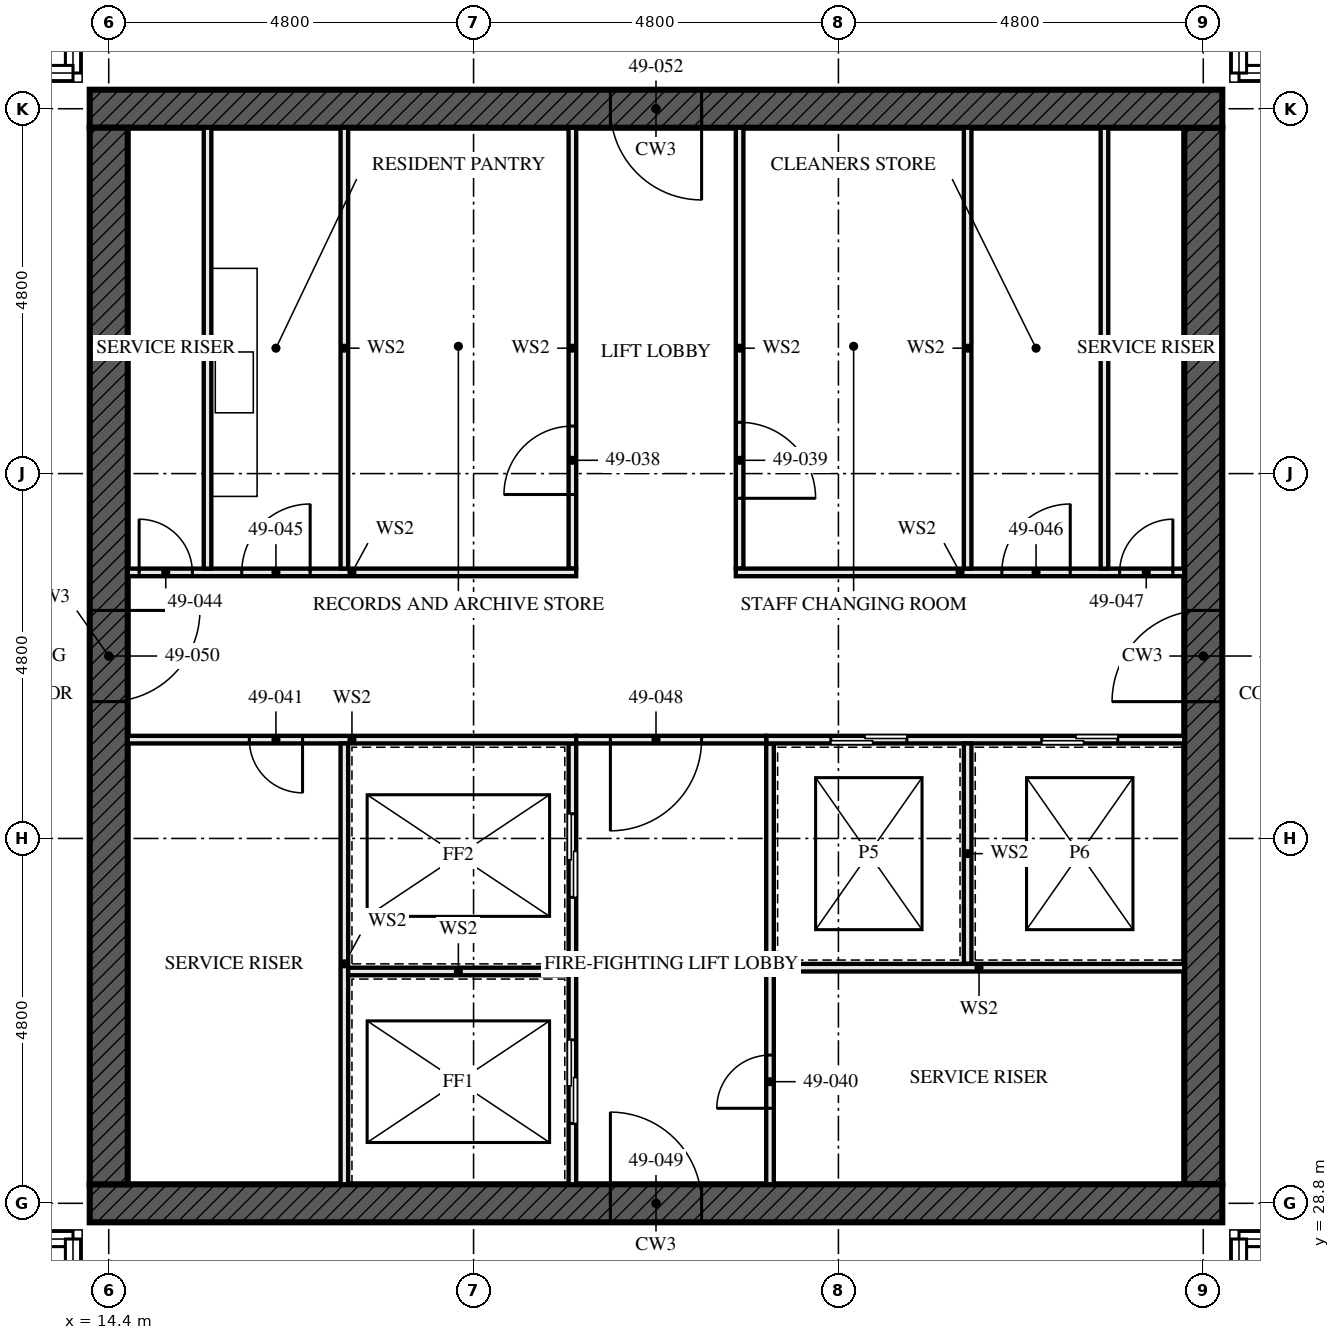
"""IFC4 building model, lengths in metres.
Left out: names, types, materials, properties, quantities, classifications, styles, units other than length and angle.
Written with IfcOpenShell. Run it as: python <this file> out.ifc"""

import sys

from ifc_helpers import new_model, si_unit, direction, frame, frame_2d, origin, place, context, subcontext, project, spatial, rectangle, extrude, element, fill, save


model = new_model("IFC4")
c1 = context("Model", 3, precision=1e-05, world=origin(), true_north=direction((0.0, 1.0)))
c2 = subcontext(c1, "Body", "Model", "MODEL_VIEW")
j1 = project(units=[si_unit("LENGTHUNIT", "METRE"), si_unit("PLANEANGLEUNIT", "RADIAN")], contexts=[c1])
p1 = place(None, origin())
s1 = spatial("IfcSite", under=j1, at=p1, CompositionType="ELEMENT")
p2 = place(p1, origin())
s2 = spatial("IfcBuilding", under=s1, at=p2, CompositionType="ELEMENT")
p3 = place(p2, frame((0.0, 0.0, 179.5)))
s3 = spatial("IfcBuildingStorey", under=s2, at=p3, CompositionType="ELEMENT", Elevation=179.5)
p4 = place(p3, frame((14.15, 28.8, -0.17), z_axis=(0.0, 0.0, 1.0), x_axis=(1.0, 0.0, 0.0)))
e1 = element("IfcWall", 1, at=p4, inside=s3, PredefinedType="SHEAR", context=c2, shape_type="SweptSolid", body=[
    extrude(rectangle(XDim=14.9, YDim=0.5, at=frame_2d((7.45, 0.0))), origin(), (0.0, 0.0, 1.0), 3.5),
])
p5 = place(p4, frame((6.85, 0.0, 0.17)))
e2 = element("IfcOpeningElement", 2, at=p5, cuts=e1, PredefinedType="OPENING", context=c2, shape_type="SweptSolid", body=[
    extrude(rectangle(XDim=1.2, YDim=2.1, at=frame_2d((0.6, 1.05))), frame((0.0, 0.26, 0.0), z_axis=(0.0, -1.0, 0.0), x_axis=(1.0, 0.0, 0.0)), (0.0, 0.0, 1.0), 0.521),
])
p6 = place(p3, frame((29.05, 43.2, -0.17), z_axis=(0.0, 0.0, 1.0), x_axis=(-1.0, 0.0, 0.0)))
e3 = element("IfcWall", 3, at=p6, inside=s3, PredefinedType="SHEAR", context=c2, shape_type="SweptSolid", body=[
    extrude(rectangle(XDim=14.9, YDim=0.5, at=frame_2d((7.45, 0.0))), origin(), (0.0, 0.0, 1.0), 3.5),
])
p7 = place(p6, frame((6.85, 0.0, 0.17)))
e4 = element("IfcOpeningElement", 4, at=p7, cuts=e3, PredefinedType="OPENING", context=c2, shape_type="SweptSolid", body=[
    extrude(rectangle(XDim=1.2, YDim=2.1, at=frame_2d((0.6, 1.05))), frame((0.0, 0.26, 0.0), z_axis=(0.0, -1.0, 0.0), x_axis=(1.0, 0.0, 0.0)), (0.0, 0.0, 1.0), 0.521),
])
p8 = place(p3, frame((14.4, 42.95, -0.17), z_axis=(0.0, 0.0, 1.0), x_axis=(0.0, -1.0, 0.0)))
e5 = element("IfcWall", 5, at=p8, inside=s3, PredefinedType="SHEAR", context=c2, shape_type="SweptSolid", body=[
    extrude(rectangle(XDim=13.9, YDim=0.5, at=frame_2d((6.95, 0.0))), origin(), (0.0, 0.0, 1.0), 3.5),
])
p9 = place(p8, frame((6.35, 0.0, 0.17)))
e6 = element("IfcOpeningElement", 6, at=p9, cuts=e5, PredefinedType="OPENING", context=c2, shape_type="SweptSolid", body=[
    extrude(rectangle(XDim=1.2, YDim=2.1, at=frame_2d((0.6, 1.05))), frame((0.0, 0.26, 0.0), z_axis=(0.0, -1.0, 0.0), x_axis=(1.0, 0.0, 0.0)), (0.0, 0.0, 1.0), 0.521),
])
p10 = place(p3, frame((28.8, 29.05, -0.17), z_axis=(0.0, 0.0, 1.0), x_axis=(0.0, 1.0, 0.0)))
e7 = element("IfcWall", 7, at=p10, inside=s3, PredefinedType="SHEAR", context=c2, shape_type="SweptSolid", body=[
    extrude(rectangle(XDim=13.9, YDim=0.5, at=frame_2d((6.95, 0.0))), origin(), (0.0, 0.0, 1.0), 3.5),
])
p11 = place(p10, frame((6.35, 0.0, 0.17)))
e8 = element("IfcOpeningElement", 8, at=p11, cuts=e7, PredefinedType="OPENING", context=c2, shape_type="SweptSolid", body=[
    extrude(rectangle(XDim=1.2, YDim=2.1, at=frame_2d((0.6, 1.05))), frame((0.0, 0.26, 0.0), z_axis=(0.0, -1.0, 0.0), x_axis=(1.0, 0.0, 0.0)), (0.0, 0.0, 1.0), 0.521),
])
for number, where, z_axis, x_axis in (
    (9, (15.7, 37.15, 0.0), (0.0, 0.0, 1.0), (0.0, 1.0, 0.0)),
    (10, (27.5, 37.15, 0.0), (0.0, 0.0, 1.0), (0.0, 1.0, 0.0)),
):
    element("IfcWall", number, at=place(p3, frame(where, z_axis=z_axis, x_axis=x_axis)), inside=s3, PredefinedType="SOLIDWALL", context=c2, shape_type="SweptSolid", body=[
        extrude(rectangle(XDim=5.8, YDim=0.1, at=frame_2d((2.9, 0.0))), origin(), (0.0, 0.0, 1.0), 3.33),
    ])
p12 = place(p3, frame((20.5, 29.05, 0.0), z_axis=(0.0, 0.0, 1.0), x_axis=(0.0, 1.0, 0.0)))
e11 = element("IfcWall", 11, at=p12, inside=s3, PredefinedType="SOLIDWALL", context=c2, shape_type="SweptSolid", body=[
    extrude(rectangle(XDim=5.8, YDim=0.1, at=frame_2d((2.9, 0.0))), origin(), (0.0, 0.0, 1.0), 3.33),
])
p13 = place(p12, frame((0.8, 0.0, 0.0)))
e12 = element("IfcOpeningElement", 12, at=p13, cuts=e11, PredefinedType="OPENING", context=c2, shape_type="SweptSolid", body=[
    extrude(rectangle(XDim=1.1, YDim=2.3, at=frame_2d((0.55, 1.15))), frame((0.0, 0.061, 0.0), z_axis=(0.0, -1.0, 0.0), x_axis=(1.0, 0.0, 0.0)), (0.0, 0.0, 1.0), 0.121),
])
p14 = place(p12, frame((3.775, 0.0, 0.0)))
e13 = element("IfcOpeningElement", 13, at=p14, cuts=e11, PredefinedType="OPENING", context=c2, shape_type="SweptSolid", body=[
    extrude(rectangle(XDim=1.1, YDim=2.3, at=frame_2d((0.55, 1.15))), frame((0.0, 0.061, 0.0), z_axis=(0.0, -1.0, 0.0), x_axis=(1.0, 0.0, 0.0)), (0.0, 0.0, 1.0), 0.121),
])
p15 = place(p3, frame((20.5, 37.15, 0.0), z_axis=(0.0, 0.0, 1.0), x_axis=(0.0, 1.0, 0.0)))
e14 = element("IfcWall", 14, at=p15, inside=s3, PredefinedType="SOLIDWALL", context=c2, shape_type="SweptSolid", body=[
    extrude(rectangle(XDim=5.8, YDim=0.1, at=frame_2d((2.9, 0.0))), origin(), (0.0, 0.0, 1.0), 3.33),
])
p16 = place(p15, frame((0.975, 0.0, 0.0)))
e15 = element("IfcOpeningElement", 15, at=p16, cuts=e14, PredefinedType="OPENING", context=c2, shape_type="SweptSolid", body=[
    extrude(rectangle(XDim=0.9, YDim=2.1, at=frame_2d((0.45, 1.05))), frame((0.0, 0.061, 0.0), z_axis=(0.0, -1.0, 0.0), x_axis=(1.0, 0.0, 0.0)), (0.0, 0.0, 1.0), 0.121),
])
p17 = place(p3, frame((22.7, 37.15, 0.0), z_axis=(0.0, 0.0, 1.0), x_axis=(0.0, 1.0, 0.0)))
e16 = element("IfcWall", 16, at=p17, inside=s3, PredefinedType="SOLIDWALL", context=c2, shape_type="SweptSolid", body=[
    extrude(rectangle(XDim=5.8, YDim=0.1, at=frame_2d((2.9, 0.0))), origin(), (0.0, 0.0, 1.0), 3.33),
])
p18 = place(p17, frame((0.925, 0.0, 0.0)))
e17 = element("IfcOpeningElement", 17, at=p18, cuts=e16, PredefinedType="OPENING", context=c2, shape_type="SweptSolid", body=[
    extrude(rectangle(XDim=1.0, YDim=2.1, at=frame_2d((0.5, 1.05))), frame((0.0, 0.061, 0.0), z_axis=(0.0, -1.0, 0.0), x_axis=(1.0, 0.0, 0.0)), (0.0, 0.0, 1.0), 0.121),
])
p19 = place(p3, frame((23.1, 29.05, 0.0), z_axis=(0.0, 0.0, 1.0), x_axis=(0.0, 1.0, 0.0)))
e18 = element("IfcWall", 18, at=p19, inside=s3, PredefinedType="SOLIDWALL", context=c2, shape_type="SweptSolid", body=[
    extrude(rectangle(XDim=5.8, YDim=0.1, at=frame_2d((2.9, 0.0))), origin(), (0.0, 0.0, 1.0), 3.33),
])
p20 = place(p19, frame((1.0, 0.0, 0.0)))
e19 = element("IfcOpeningElement", 19, at=p20, cuts=e18, PredefinedType="OPENING", context=c2, shape_type="SweptSolid", body=[
    extrude(rectangle(XDim=0.7, YDim=2.1, at=frame_2d((0.35, 1.05))), frame((0.0, 0.061, 0.0), z_axis=(0.0, -1.0, 0.0), x_axis=(1.0, 0.0, 0.0)), (0.0, 0.0, 1.0), 0.121),
])
p21 = place(p3, frame((14.65, 34.9, 0.0), z_axis=(0.0, 0.0, 1.0), x_axis=(1.0, 0.0, 0.0)))
e20 = element("IfcWall", 20, at=p21, inside=s3, PredefinedType="SOLIDWALL", context=c2, shape_type="SweptSolid", body=[
    extrude(rectangle(XDim=5.9, YDim=0.1, at=frame_2d((2.95, 0.0))), origin(), (0.0, 0.0, 1.0), 3.33),
])
p22 = place(p21, frame((1.6, 0.0, 0.0)))
e21 = element("IfcOpeningElement", 21, at=p22, cuts=e20, PredefinedType="OPENING", context=c2, shape_type="SweptSolid", body=[
    extrude(rectangle(XDim=0.7, YDim=2.1, at=frame_2d((0.35, 1.05))), frame((0.0, 0.061, 0.0), z_axis=(0.0, -1.0, 0.0), x_axis=(1.0, 0.0, 0.0)), (0.0, 0.0, 1.0), 0.121),
])
p23 = place(p3, frame((23.05, 34.9, 0.0), z_axis=(0.0, 0.0, 1.0), x_axis=(1.0, 0.0, 0.0)))
e22 = element("IfcWall", 22, at=p23, inside=s3, PredefinedType="SOLIDWALL", context=c2, shape_type="SweptSolid", body=[
    extrude(rectangle(XDim=5.5, YDim=0.1, at=frame_2d((2.75, 0.0))), origin(), (0.0, 0.0, 1.0), 3.33),
])
p24 = place(p23, frame((0.85, 0.0, 0.0)))
e23 = element("IfcOpeningElement", 23, at=p24, cuts=e22, PredefinedType="OPENING", context=c2, shape_type="SweptSolid", body=[
    extrude(rectangle(XDim=1.0, YDim=2.1, at=frame_2d((0.5, 1.05))), frame((0.0, 0.061, 0.0), z_axis=(0.0, -1.0, 0.0), x_axis=(1.0, 0.0, 0.0)), (0.0, 0.0, 1.0), 0.121),
])
p25 = place(p23, frame((3.625, 0.0, 0.0)))
e24 = element("IfcOpeningElement", 24, at=p25, cuts=e22, PredefinedType="OPENING", context=c2, shape_type="SweptSolid", body=[
    extrude(rectangle(XDim=1.0, YDim=2.1, at=frame_2d((0.5, 1.05))), frame((0.0, 0.061, 0.0), z_axis=(0.0, -1.0, 0.0), x_axis=(1.0, 0.0, 0.0)), (0.0, 0.0, 1.0), 0.121),
])
p26 = place(p3, frame((14.65, 37.1, 0.0), z_axis=(0.0, 0.0, 1.0), x_axis=(1.0, 0.0, 0.0)))
e25 = element("IfcWall", 25, at=p26, inside=s3, PredefinedType="SOLIDWALL", context=c2, shape_type="SweptSolid", body=[
    extrude(rectangle(XDim=5.9, YDim=0.1, at=frame_2d((2.95, 0.0))), origin(), (0.0, 0.0, 1.0), 3.33),
])
p27 = place(p26, frame((0.15, 0.0, 0.0)))
e26 = element("IfcOpeningElement", 26, at=p27, cuts=e25, PredefinedType="OPENING", context=c2, shape_type="SweptSolid", body=[
    extrude(rectangle(XDim=0.7, YDim=2.1, at=frame_2d((0.35, 1.05))), frame((0.0, 0.061, 0.0), z_axis=(0.0, -1.0, 0.0), x_axis=(1.0, 0.0, 0.0)), (0.0, 0.0, 1.0), 0.121),
])
p28 = place(p26, frame((1.5, 0.0, 0.0)))
e27 = element("IfcOpeningElement", 27, at=p28, cuts=e25, PredefinedType="OPENING", context=c2, shape_type="SweptSolid", body=[
    extrude(rectangle(XDim=0.9, YDim=2.1, at=frame_2d((0.45, 1.05))), frame((0.0, 0.061, 0.0), z_axis=(0.0, -1.0, 0.0), x_axis=(1.0, 0.0, 0.0)), (0.0, 0.0, 1.0), 0.121),
])
p29 = place(p3, frame((22.65, 37.1, 0.0), z_axis=(0.0, 0.0, 1.0), x_axis=(1.0, 0.0, 0.0)))
e28 = element("IfcWall", 28, at=p29, inside=s3, PredefinedType="SOLIDWALL", context=c2, shape_type="SweptSolid", body=[
    extrude(rectangle(XDim=5.9, YDim=0.1, at=frame_2d((2.95, 0.0))), origin(), (0.0, 0.0, 1.0), 3.33),
])
p30 = place(p29, frame((3.5, 0.0, 0.0)))
e29 = element("IfcOpeningElement", 29, at=p30, cuts=e28, PredefinedType="OPENING", context=c2, shape_type="SweptSolid", body=[
    extrude(rectangle(XDim=0.9, YDim=2.1, at=frame_2d((0.45, 1.05))), frame((0.0, 0.061, 0.0), z_axis=(0.0, -1.0, 0.0), x_axis=(1.0, 0.0, 0.0)), (0.0, 0.0, 1.0), 0.121),
])
p31 = place(p29, frame((5.05, 0.0, 0.0)))
e30 = element("IfcOpeningElement", 30, at=p31, cuts=e28, PredefinedType="OPENING", context=c2, shape_type="SweptSolid", body=[
    extrude(rectangle(XDim=0.7, YDim=2.1, at=frame_2d((0.35, 1.05))), frame((0.0, 0.061, 0.0), z_axis=(0.0, -1.0, 0.0), x_axis=(1.0, 0.0, 0.0)), (0.0, 0.0, 1.0), 0.121),
])
p32 = place(p3, frame((20.55, 34.9, 0.0), z_axis=(0.0, 0.0, 1.0), x_axis=(1.0, 0.0, 0.0)))
e31 = element("IfcWall", 31, at=p32, inside=s3, PredefinedType="SOLIDWALL", context=c2, shape_type="SweptSolid", body=[
    extrude(rectangle(XDim=2.5, YDim=0.1, at=frame_2d((1.25, 0.0))), origin(), (0.0, 0.0, 1.0), 3.33),
])
p33 = place(p32, frame((0.45, 0.0, 0.0)))
e32 = element("IfcOpeningElement", 32, at=p33, cuts=e31, PredefinedType="OPENING", context=c2, shape_type="SweptSolid", body=[
    extrude(rectangle(XDim=1.2, YDim=2.1, at=frame_2d((0.6, 1.05))), frame((0.0, 0.061, 0.0), z_axis=(0.0, -1.0, 0.0), x_axis=(1.0, 0.0, 0.0)), (0.0, 0.0, 1.0), 0.121),
])
p34 = place(p3, frame((17.5, 29.05, 0.0), z_axis=(0.0, 0.0, 1.0), x_axis=(0.0, 1.0, 0.0)))
e33 = element("IfcWall", 33, at=p34, inside=s3, PredefinedType="SOLIDWALL", context=c2, shape_type="SweptSolid", body=[
    extrude(rectangle(XDim=5.8, YDim=0.1, at=frame_2d((2.9, 0.0))), origin(), (0.0, 0.0, 1.0), 3.33),
])
p35 = place(p3, frame((17.55, 31.85, 0.0), z_axis=(0.0, 0.0, 1.0), x_axis=(1.0, 0.0, 0.0)))
e34 = element("IfcWall", 34, at=p35, inside=s3, PredefinedType="SOLIDWALL", context=c2, shape_type="SweptSolid", body=[
    extrude(rectangle(XDim=2.9, YDim=0.1, at=frame_2d((1.45, 0.0))), origin(), (0.0, 0.0, 1.0), 3.33),
])
for number, where, z_axis, x_axis in (
    (35, (17.5, 37.15, 0.0), (0.0, 0.0, 1.0), (0.0, 1.0, 0.0)),
    (36, (25.7, 37.15, 0.0), (0.0, 0.0, 1.0), (0.0, 1.0, 0.0)),
):
    element("IfcWall", number, at=place(p3, frame(where, z_axis=z_axis, x_axis=x_axis)), inside=s3, PredefinedType="SOLIDWALL", context=c2, shape_type="SweptSolid", body=[
        extrude(rectangle(XDim=5.8, YDim=0.1, at=frame_2d((2.9, 0.0))), origin(), (0.0, 0.0, 1.0), 3.33),
    ])
p36 = place(p3, frame((25.7, 31.95, 0.0), z_axis=(0.0, 0.0, 1.0), x_axis=(0.0, 1.0, 0.0)))
e37 = element("IfcWall", 37, at=p36, inside=s3, PredefinedType="SOLIDWALL", context=c2, shape_type="SweptSolid", body=[
    extrude(rectangle(XDim=2.9, YDim=0.1, at=frame_2d((1.45, 0.0))), origin(), (0.0, 0.0, 1.0), 3.33),
])
p37 = place(p3, frame((23.15, 31.9, 0.0), z_axis=(0.0, 0.0, 1.0), x_axis=(1.0, 0.0, 0.0)))
e38 = element("IfcWall", 38, at=p37, inside=s3, PredefinedType="SOLIDWALL", context=c2, shape_type="SweptSolid", body=[
    extrude(rectangle(XDim=5.4, YDim=0.1, at=frame_2d((2.7, 0.0))), origin(), (0.0, 0.0, 1.0), 3.33),
])
p38 = place(p13, origin())
e39 = element("IfcDoor", 39, at=p38, inside=s3, OperationType="SLIDING_TO_LEFT", PredefinedType="DOOR", context=c2, shape_type="SweptSolid", body=[
    extrude(rectangle(XDim=1.1, YDim=2.3, at=frame_2d((0.55, 1.15))), frame((0.0, 0.05, 0.0), z_axis=(0.0, -1.0, 0.0), x_axis=(1.0, 0.0, 0.0)), (0.0, 0.0, 1.0), 0.1),
])
fill(e12, e39)
p39 = place(p14, origin())
e40 = element("IfcDoor", 40, at=p39, inside=s3, OperationType="SLIDING_TO_LEFT", PredefinedType="DOOR", context=c2, shape_type="SweptSolid", body=[
    extrude(rectangle(XDim=1.1, YDim=2.3, at=frame_2d((0.55, 1.15))), frame((0.0, 0.05, 0.0), z_axis=(0.0, -1.0, 0.0), x_axis=(1.0, 0.0, 0.0)), (0.0, 0.0, 1.0), 0.1),
])
fill(e13, e40)
p40 = place(p16, origin())
e41 = element("IfcDoor", 41, at=p40, inside=s3, OperationType="SINGLE_SWING_RIGHT", PredefinedType="DOOR", context=c2, shape_type="SweptSolid", body=[
    extrude(rectangle(XDim=0.9, YDim=2.1, at=frame_2d((0.45, 1.05))), frame((0.0, 0.027, 0.0), z_axis=(0.0, -1.0, 0.0), x_axis=(1.0, 0.0, 0.0)), (0.0, 0.0, 1.0), 0.054),
])
fill(e15, e41)
p41 = place(p18, frame((1.0, 0.0, 0.0), z_axis=(0.0, 0.0, 1.0), x_axis=(-1.0, 0.0, 0.0)))
e42 = element("IfcDoor", 42, at=p41, inside=s3, OperationType="SINGLE_SWING_LEFT", PredefinedType="DOOR", context=c2, shape_type="SweptSolid", body=[
    extrude(rectangle(XDim=1.0, YDim=2.1, at=frame_2d((0.5, 1.05))), frame((0.0, 0.027, 0.0), z_axis=(0.0, -1.0, 0.0), x_axis=(1.0, 0.0, 0.0)), (0.0, 0.0, 1.0), 0.054),
])
fill(e17, e42)
p42 = place(p20, origin())
e43 = element("IfcDoor", 43, at=p42, inside=s3, OperationType="SINGLE_SWING_RIGHT", PredefinedType="DOOR", context=c2, shape_type="SweptSolid", body=[
    extrude(rectangle(XDim=0.7, YDim=2.1, at=frame_2d((0.35, 1.05))), frame((0.0, 0.027, 0.0), z_axis=(0.0, -1.0, 0.0), x_axis=(1.0, 0.0, 0.0)), (0.0, 0.0, 1.0), 0.054),
])
fill(e19, e43)
p43 = place(p22, frame((0.7, 0.0, 0.0), z_axis=(0.0, 0.0, 1.0), x_axis=(-1.0, 0.0, 0.0)))
e44 = element("IfcDoor", 44, at=p43, inside=s3, OperationType="SINGLE_SWING_RIGHT", PredefinedType="DOOR", context=c2, shape_type="SweptSolid", body=[
    extrude(rectangle(XDim=0.7, YDim=2.1, at=frame_2d((0.35, 1.05))), frame((0.0, 0.027, 0.0), z_axis=(0.0, -1.0, 0.0), x_axis=(1.0, 0.0, 0.0)), (0.0, 0.0, 1.0), 0.054),
])
fill(e21, e44)
p44 = place(p24, origin())
e45 = element("IfcDoor", 45, at=p44, inside=s3, OperationType="SLIDING_TO_LEFT", PredefinedType="DOOR", context=c2, shape_type="SweptSolid", body=[
    extrude(rectangle(XDim=1.0, YDim=2.1, at=frame_2d((0.5, 1.05))), frame((0.0, 0.05, 0.0), z_axis=(0.0, -1.0, 0.0), x_axis=(1.0, 0.0, 0.0)), (0.0, 0.0, 1.0), 0.1),
])
fill(e23, e45)
p45 = place(p25, origin())
e46 = element("IfcDoor", 46, at=p45, inside=s3, OperationType="SLIDING_TO_LEFT", PredefinedType="DOOR", context=c2, shape_type="SweptSolid", body=[
    extrude(rectangle(XDim=1.0, YDim=2.1, at=frame_2d((0.5, 1.05))), frame((0.0, 0.05, 0.0), z_axis=(0.0, -1.0, 0.0), x_axis=(1.0, 0.0, 0.0)), (0.0, 0.0, 1.0), 0.1),
])
fill(e24, e46)
p46 = place(p27, origin())
e47 = element("IfcDoor", 47, at=p46, inside=s3, OperationType="SINGLE_SWING_RIGHT", PredefinedType="DOOR", context=c2, shape_type="SweptSolid", body=[
    extrude(rectangle(XDim=0.7, YDim=2.1, at=frame_2d((0.35, 1.05))), frame((0.0, 0.027, 0.0), z_axis=(0.0, -1.0, 0.0), x_axis=(1.0, 0.0, 0.0)), (0.0, 0.0, 1.0), 0.054),
])
fill(e26, e47)
p47 = place(p28, origin())
e48 = element("IfcDoor", 48, at=p47, inside=s3, OperationType="SINGLE_SWING_LEFT", PredefinedType="DOOR", context=c2, shape_type="SweptSolid", body=[
    extrude(rectangle(XDim=0.9, YDim=2.1, at=frame_2d((0.45, 1.05))), frame((0.0, 0.027, 0.0), z_axis=(0.0, -1.0, 0.0), x_axis=(1.0, 0.0, 0.0)), (0.0, 0.0, 1.0), 0.054),
])
fill(e27, e48)
p48 = place(p30, origin())
e49 = element("IfcDoor", 49, at=p48, inside=s3, OperationType="SINGLE_SWING_LEFT", PredefinedType="DOOR", context=c2, shape_type="SweptSolid", body=[
    extrude(rectangle(XDim=0.9, YDim=2.1, at=frame_2d((0.45, 1.05))), frame((0.0, 0.027, 0.0), z_axis=(0.0, -1.0, 0.0), x_axis=(1.0, 0.0, 0.0)), (0.0, 0.0, 1.0), 0.054),
])
fill(e29, e49)
p49 = place(p31, origin())
e50 = element("IfcDoor", 50, at=p49, inside=s3, OperationType="SINGLE_SWING_LEFT", PredefinedType="DOOR", context=c2, shape_type="SweptSolid", body=[
    extrude(rectangle(XDim=0.7, YDim=2.1, at=frame_2d((0.35, 1.05))), frame((0.0, 0.027, 0.0), z_axis=(0.0, -1.0, 0.0), x_axis=(1.0, 0.0, 0.0)), (0.0, 0.0, 1.0), 0.054),
])
fill(e30, e50)
p50 = place(p33, frame((1.2, 0.0, 0.0), z_axis=(0.0, 0.0, 1.0), x_axis=(-1.0, 0.0, 0.0)))
e51 = element("IfcDoor", 51, at=p50, inside=s3, OperationType="SINGLE_SWING_LEFT", PredefinedType="DOOR", context=c2, shape_type="SweptSolid", body=[
    extrude(rectangle(XDim=1.2, YDim=2.1, at=frame_2d((0.6, 1.05))), frame((0.0, 0.027, 0.0), z_axis=(0.0, -1.0, 0.0), x_axis=(1.0, 0.0, 0.0)), (0.0, 0.0, 1.0), 0.054),
])
fill(e32, e51)
p51 = place(p5, origin())
e52 = element("IfcDoor", 52, at=p51, inside=s3, OperationType="SINGLE_SWING_LEFT", PredefinedType="DOOR", context=c2, shape_type="SweptSolid", body=[
    extrude(rectangle(XDim=1.2, YDim=2.1, at=frame_2d((0.6, 1.05))), frame((0.0, 0.027, 0.0), z_axis=(0.0, -1.0, 0.0), x_axis=(1.0, 0.0, 0.0)), (0.0, 0.0, 1.0), 0.054),
])
fill(e2, e52)
p52 = place(p9, origin())
e53 = element("IfcDoor", 53, at=p52, inside=s3, OperationType="SINGLE_SWING_LEFT", PredefinedType="DOOR", context=c2, shape_type="SweptSolid", body=[
    extrude(rectangle(XDim=1.2, YDim=2.1, at=frame_2d((0.6, 1.05))), frame((0.0, 0.027, 0.0), z_axis=(0.0, -1.0, 0.0), x_axis=(1.0, 0.0, 0.0)), (0.0, 0.0, 1.0), 0.054),
])
fill(e6, e53)
p53 = place(p11, origin())
e54 = element("IfcDoor", 54, at=p53, inside=s3, OperationType="SINGLE_SWING_LEFT", PredefinedType="DOOR", context=c2, shape_type="SweptSolid", body=[
    extrude(rectangle(XDim=1.2, YDim=2.1, at=frame_2d((0.6, 1.05))), frame((0.0, 0.027, 0.0), z_axis=(0.0, -1.0, 0.0), x_axis=(1.0, 0.0, 0.0)), (0.0, 0.0, 1.0), 0.054),
])
fill(e8, e54)
p54 = place(p7, origin())
e55 = element("IfcDoor", 55, at=p54, inside=s3, OperationType="SINGLE_SWING_LEFT", PredefinedType="DOOR", context=c2, shape_type="SweptSolid", body=[
    extrude(rectangle(XDim=1.2, YDim=2.1, at=frame_2d((0.6, 1.05))), frame((0.0, 0.027, 0.0), z_axis=(0.0, -1.0, 0.0), x_axis=(1.0, 0.0, 0.0)), (0.0, 0.0, 1.0), 0.054),
])
fill(e4, e55)
save(model, sys.argv[1])
